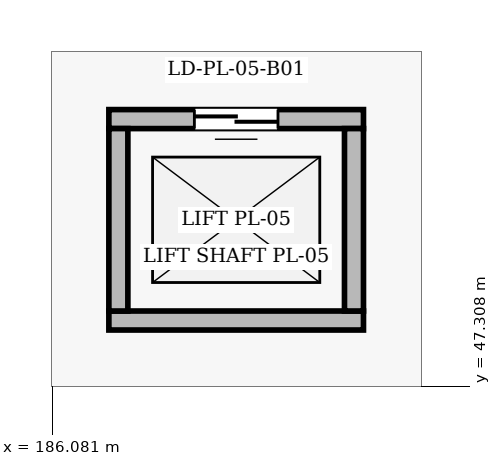
"""IFC4 building model, lengths in metres.
Left out: names, types, materials, properties, quantities, classifications, styles, units other than length and angle.
Written with IfcOpenShell. Run it as: python <this file> out.ifc"""

import sys

from ifc_helpers import new_model, si_unit, direction, frame, frame_2d, origin, place, context, subcontext, project, spatial, rectangle, extrude, element, fill, save


model = new_model("IFC4")
c1 = context("Model", 3, precision=1e-05, world=origin(), true_north=direction((0.0, 1.0)))
c2 = subcontext(c1, "Body", "Model", "MODEL_VIEW")
j1 = project(units=[si_unit("LENGTHUNIT", "METRE"), si_unit("PLANEANGLEUNIT", "RADIAN")], contexts=[c1])
p1 = place(None, origin())
s1 = spatial("IfcSite", under=j1, at=p1, CompositionType="ELEMENT")
p2 = place(p1, origin())
s2 = spatial("IfcBuilding", under=s1, at=p2, CompositionType="ELEMENT")
p3 = place(p2, frame((0.0, 0.0, -5.4)))
s3 = spatial("IfcBuildingStorey", under=s2, at=p3, CompositionType="ELEMENT", Elevation=-5.4)
p4 = place(p3, frame((186.825, 48.175, 0.0), z_axis=(0.0, 0.0, 1.0), x_axis=(1.0, 0.0, 0.0)))
e1 = element("IfcWall", 1, at=p4, inside=s3, PredefinedType="SOLIDWALL", context=c2, shape_type="SweptSolid", body=[
    extrude(rectangle(XDim=3.35, YDim=0.25, at=frame_2d((1.675, 0.0))), origin(), (0.0, 0.0, 1.0), 5.1),
])
p5 = place(p3, frame((190.175, 50.825, 0.0), z_axis=(0.0, 0.0, 1.0), x_axis=(-1.0, 0.0, 0.0)))
e2 = element("IfcWall", 2, at=p5, inside=s3, PredefinedType="SOLIDWALL", context=c2, shape_type="SweptSolid", body=[
    extrude(rectangle(XDim=3.35, YDim=0.25, at=frame_2d((1.675, 0.0))), origin(), (0.0, 0.0, 1.0), 5.1),
])
p6 = place(p5, frame((1.125, 0.0, 0.0)))
e3 = element("IfcOpeningElement", 3, at=p6, cuts=e2, PredefinedType="OPENING", context=c2, shape_type="SweptSolid", body=[
    extrude(rectangle(XDim=1.1, YDim=2.2, at=frame_2d((0.55, 1.1))), frame((0.0, 0.135, 0.0), z_axis=(0.0, -1.0, 0.0), x_axis=(1.0, 0.0, 0.0)), (0.0, 0.0, 1.0), 0.27),
])
for number, where, z_axis, x_axis in (
    (4, (186.95, 50.7, 0.0), (0.0, 0.0, 1.0), (0.0, -1.0, 0.0)),
    (5, (190.05, 48.3, 0.0), (0.0, 0.0, 1.0), (0.0, 1.0, 0.0)),
):
    element("IfcWall", number, at=place(p3, frame(where, z_axis=z_axis, x_axis=x_axis)), inside=s3, PredefinedType="SOLIDWALL", context=c2, shape_type="SweptSolid", body=[
        extrude(rectangle(XDim=2.4, YDim=0.25, at=frame_2d((1.2, 0.0))), origin(), (0.0, 0.0, 1.0), 5.1),
    ])
p7 = place(p6, origin())
e6 = element("IfcDoor", 6, at=p7, inside=s3, OperationType="DOUBLE_DOOR_SLIDING", PredefinedType="DOOR", context=c2, shape_type="SweptSolid", body=[
    extrude(rectangle(XDim=1.1, YDim=2.2, at=frame_2d((0.55, 1.1))), frame((0.0, 0.025, 0.0), z_axis=(0.0, -1.0, 0.0), x_axis=(1.0, 0.0, 0.0)), (0.0, 0.0, 1.0), 0.05),
])
fill(e3, e6)
save(model, sys.argv[1])
